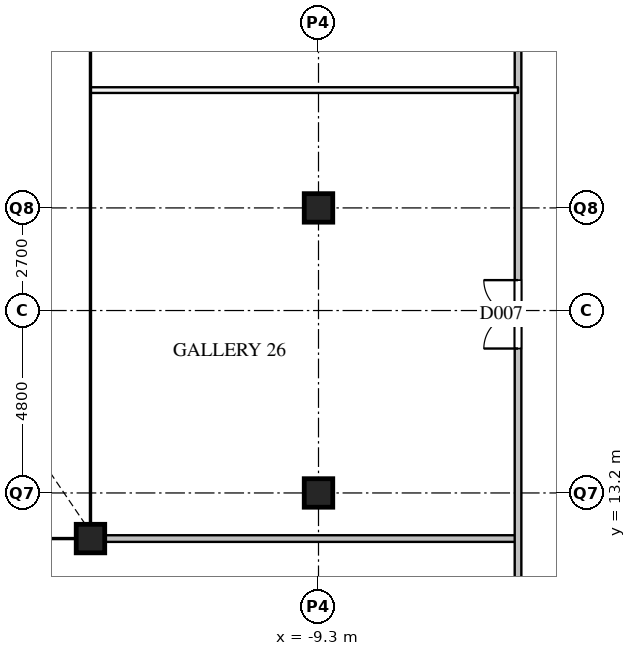
"""IFC4 building model, lengths in metres.
Left out: names, types, materials, properties, quantities, classifications, styles, units other than length and angle.
Written with IfcOpenShell. Run it as: python <this file> out.ifc"""

import sys

from ifc_helpers import new_model, si_unit, direction, frame, frame_2d, origin, origin_2d, place, context, subcontext, project, spatial, rectangle, extrude, element, fill, save


model = new_model("IFC4")
c1 = context("Model", 3, precision=1e-05, world=origin(), true_north=direction((0.0, 1.0)))
c2 = subcontext(c1, "Body", "Model", "MODEL_VIEW")
j1 = project(units=[si_unit("LENGTHUNIT", "METRE"), si_unit("PLANEANGLEUNIT", "RADIAN")], contexts=[c1])
p1 = place(None, origin())
s1 = spatial("IfcSite", under=j1, at=p1, CompositionType="ELEMENT")
p2 = place(p1, origin())
s2 = spatial("IfcBuilding", under=s1, at=p2, CompositionType="ELEMENT")
p3 = place(p2, frame((0.0, 0.0, 21.0)))
s3 = spatial("IfcBuildingStorey", under=s2, at=p3, CompositionType="ELEMENT", Elevation=21.0)
for number, where, z_axis, x_axis in (
    (1, (-9.3, 13.2, 0.0), (0.0, 0.0, 1.0), (1.0, 0.0, 0.0)),
    (2, (-9.3, 20.7, 0.0), (0.0, 0.0, 1.0), (1.0, 0.0, 0.0)),
    (3, (-15.3, 12.0, 0.0), (0.0, 0.0, 1.0), (1.0, 0.0, 0.0)),
):
    element("IfcColumn", number, at=place(p3, frame(where, z_axis=z_axis, x_axis=x_axis)), inside=s3, PredefinedType="COLUMN", context=c2, shape_type="SweptSolid", body=[
        extrude(rectangle(XDim=0.75, YDim=0.75, at=origin_2d()), origin(), (0.0, 0.0, 1.0), 5.0),
    ])
p4 = place(p3, frame((-15.3, 12.0, 0.0), z_axis=(0.0, 0.0, 1.0), x_axis=(1.0, 0.0, 0.0)))
e4 = element("IfcWall", 4, at=p4, inside=s3, PredefinedType="PARTITIONING", context=c2, shape_type="SweptSolid", body=[
    extrude(rectangle(XDim=11.25, YDim=0.175, at=frame_2d((5.625, 0.0))), origin(), (0.0, 0.0, 1.0), 3.79),
])
p5 = place(p3, frame((-4.05, -4.05, 0.0), z_axis=(0.0, 0.0, 1.0), x_axis=(0.0, 1.0, 0.0)))
e5 = element("IfcWall", 5, at=p5, inside=s3, PredefinedType="PARTITIONING", context=c2, shape_type="SweptSolid", body=[
    extrude(rectangle(XDim=63.0, YDim=0.175, at=frame_2d((31.5, 0.0))), origin(), (0.0, 0.0, 1.0), 3.79),
])
p6 = place(p5, frame((52.45, 0.0, 0.0)))
e6 = element("IfcOpeningElement", 6, at=p6, cuts=e5, PredefinedType="OPENING", context=c2, shape_type="SweptSolid", body=[
    extrude(rectangle(XDim=1.0, YDim=2.1, at=frame_2d((0.5, 1.05))), frame((0.0, 0.097, 0.0), z_axis=(0.0, -1.0, 0.0), x_axis=(1.0, 0.0, 0.0)), (0.0, 0.0, 1.0), 0.195),
])
p7 = place(p5, frame((7.525, 0.0, 0.0)))
e7 = element("IfcOpeningElement", 7, at=p7, cuts=e5, PredefinedType="OPENING", context=c2, shape_type="SweptSolid", body=[
    extrude(rectangle(XDim=1.0, YDim=2.1, at=frame_2d((0.5, 1.05))), frame((0.0, 0.097, 0.0), z_axis=(0.0, -1.0, 0.0), x_axis=(1.0, 0.0, 0.0)), (0.0, 0.0, 1.0), 0.195),
])
p8 = place(p5, frame((21.05, 0.0, 0.0)))
e8 = element("IfcOpeningElement", 8, at=p8, cuts=e5, PredefinedType="OPENING", context=c2, shape_type="SweptSolid", body=[
    extrude(rectangle(XDim=1.8, YDim=2.1, at=frame_2d((0.9, 1.05))), frame((0.0, 0.097, 0.0), z_axis=(0.0, -1.0, 0.0), x_axis=(1.0, 0.0, 0.0)), (0.0, 0.0, 1.0), 0.195),
])
p9 = place(p5, frame((32.85, 0.0, 0.0)))
e9 = element("IfcOpeningElement", 9, at=p9, cuts=e5, PredefinedType="OPENING", context=c2, shape_type="SweptSolid", body=[
    extrude(rectangle(XDim=1.8, YDim=2.1, at=frame_2d((0.9, 1.05))), frame((0.0, 0.097, 0.0), z_axis=(0.0, -1.0, 0.0), x_axis=(1.0, 0.0, 0.0)), (0.0, 0.0, 1.0), 0.195),
])
p10 = place(p5, frame((44.65, 0.0, 0.0)))
e10 = element("IfcOpeningElement", 10, at=p10, cuts=e5, PredefinedType="OPENING", context=c2, shape_type="SweptSolid", body=[
    extrude(rectangle(XDim=1.8, YDim=2.1, at=frame_2d((0.9, 1.05))), frame((0.0, 0.097, 0.0), z_axis=(0.0, -1.0, 0.0), x_axis=(1.0, 0.0, 0.0)), (0.0, 0.0, 1.0), 0.195),
])
p11 = place(p3, frame((-15.3, 23.8, 0.0), z_axis=(0.0, 0.0, 1.0), x_axis=(1.0, 0.0, 0.0)))
e11 = element("IfcWall", 11, at=p11, inside=s3, PredefinedType="PARTITIONING", context=c2, shape_type="SweptSolid", body=[
    extrude(rectangle(XDim=11.25, YDim=0.15, at=frame_2d((5.625, 0.0))), origin(), (0.0, 0.0, 1.0), 3.79),
])
p12 = place(p8, origin())
e12 = element("IfcDoor", 12, at=p12, inside=s3, OperationType="DOUBLE_DOOR_SINGLE_SWING", PredefinedType="DOOR", context=c2, shape_type="SweptSolid", body=[
    extrude(rectangle(XDim=1.8, YDim=2.1, at=frame_2d((0.9, 1.05))), frame((0.0, 0.025, 0.0), z_axis=(0.0, -1.0, 0.0), x_axis=(1.0, 0.0, 0.0)), (0.0, 0.0, 1.0), 0.05),
])
fill(e8, e12)
save(model, sys.argv[1])
